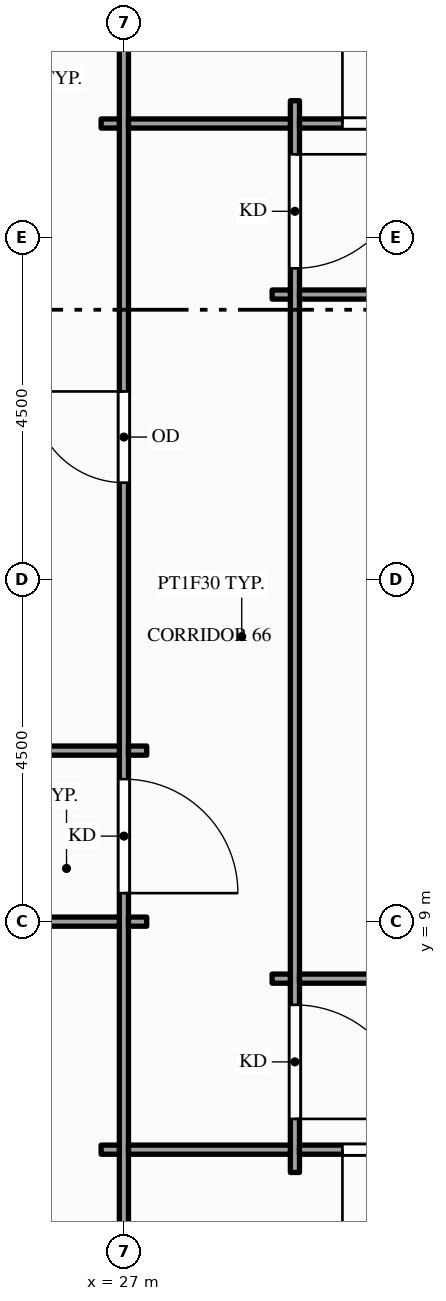
"""IFC4 building model, lengths in metres.
Left out: names, types, materials, properties, quantities, classifications, styles, units other than length and angle.
Written with IfcOpenShell. Run it as: python <this file> out.ifc"""

import sys

from ifc_helpers import new_model, si_unit, direction, frame, frame_2d, origin, place, context, subcontext, project, spatial, rectangle, extrude, element, fill, save


model = new_model("IFC4")
c1 = context("Model", 3, precision=1e-05, world=origin(), true_north=direction((0.0, 1.0)))
c2 = subcontext(c1, "Body", "Model", "MODEL_VIEW")
j1 = project(units=[si_unit("LENGTHUNIT", "METRE"), si_unit("PLANEANGLEUNIT", "RADIAN")], contexts=[c1])
p1 = place(None, origin())
s1 = spatial("IfcSite", under=j1, at=p1, CompositionType="ELEMENT")
p2 = place(p1, origin())
s2 = spatial("IfcBuilding", under=s1, at=p2, CompositionType="ELEMENT")
p3 = place(p2, frame((0.0, 0.0, 179.0)))
s3 = spatial("IfcBuildingStorey", under=s2, at=p3, CompositionType="ELEMENT", Elevation=179.0)
p4 = place(p3, frame((27.0, 1.65, 0.0), z_axis=(0.0, 0.0, 1.0), x_axis=(0.0, 1.0, 0.0)))
e1 = element("IfcWall", 1, at=p4, inside=s3, PredefinedType="PARTITIONING", context=c2, shape_type="SweptSolid", body=[
    extrude(rectangle(XDim=22.2, YDim=0.12, at=frame_2d((11.1, 0.0))), origin(), (0.0, 0.0, 1.0), 2.87),
])
p5 = place(p4, frame((7.725, 0.0, 0.0)))
e2 = element("IfcOpeningElement", 2, at=p5, cuts=e1, PredefinedType="OPENING", context=c2, shape_type="SweptSolid", body=[
    extrude(rectangle(XDim=1.5, YDim=2.1, at=frame_2d((0.75, 1.05))), frame((0.0, 0.07, 0.0), z_axis=(0.0, -1.0, 0.0), x_axis=(1.0, 0.0, 0.0)), (0.0, 0.0, 1.0), 0.14),
])
p6 = place(p4, frame((13.125, 0.0, 0.0)))
e3 = element("IfcOpeningElement", 3, at=p6, cuts=e1, PredefinedType="OPENING", context=c2, shape_type="SweptSolid", body=[
    extrude(rectangle(XDim=1.2, YDim=2.1, at=frame_2d((0.6, 1.05))), frame((0.0, 0.07, 0.0), z_axis=(0.0, -1.0, 0.0), x_axis=(1.0, 0.0, 0.0)), (0.0, 0.0, 1.0), 0.14),
])
p7 = place(p3, frame((29.25, 5.7, 0.0), z_axis=(0.0, 0.0, 1.0), x_axis=(0.0, 1.0, 0.0)))
e4 = element("IfcWall", 4, at=p7, inside=s3, PredefinedType="PARTITIONING", context=c2, shape_type="SweptSolid", body=[
    extrude(rectangle(XDim=14.1, YDim=0.12, at=frame_2d((7.05, 0.0))), origin(), (0.0, 0.0, 1.0), 2.87),
])
p8 = place(p7, frame((0.705, 0.0, 0.0)))
e5 = element("IfcOpeningElement", 5, at=p8, cuts=e4, PredefinedType="OPENING", context=c2, shape_type="SweptSolid", body=[
    extrude(rectangle(XDim=1.5, YDim=2.1, at=frame_2d((0.75, 1.05))), frame((0.0, 0.07, 0.0), z_axis=(0.0, -1.0, 0.0), x_axis=(1.0, 0.0, 0.0)), (0.0, 0.0, 1.0), 0.14),
])
p9 = place(p7, frame((11.895, 0.0, 0.0)))
e6 = element("IfcOpeningElement", 6, at=p9, cuts=e4, PredefinedType="OPENING", context=c2, shape_type="SweptSolid", body=[
    extrude(rectangle(XDim=1.5, YDim=2.1, at=frame_2d((0.75, 1.05))), frame((0.0, 0.07, 0.0), z_axis=(0.0, -1.0, 0.0), x_axis=(1.0, 0.0, 0.0)), (0.0, 0.0, 1.0), 0.14),
])
p10 = place(p3, frame((26.7, 6.0, 0.0), z_axis=(0.0, 0.0, 1.0), x_axis=(1.0, 0.0, 0.0)))
e7 = element("IfcWall", 7, at=p10, inside=s3, PredefinedType="PARTITIONING", context=c2, shape_type="SweptSolid", body=[
    extrude(rectangle(XDim=0.24, YDim=0.12, at=frame_2d((0.12, 0.0))), origin(), (0.0, 0.0, 1.0), 2.87),
])
p11 = place(p3, frame((27.06, 6.0, 0.0), z_axis=(0.0, 0.0, 1.0), x_axis=(1.0, 0.0, 0.0)))
e8 = element("IfcWall", 8, at=p11, inside=s3, PredefinedType="PARTITIONING", context=c2, shape_type="SweptSolid", body=[
    extrude(rectangle(XDim=2.13, YDim=0.12, at=frame_2d((1.065, 0.0))), origin(), (0.0, 0.0, 1.0), 2.87),
])
p12 = place(p3, frame((29.31, 6.0, 0.0), z_axis=(0.0, 0.0, 1.0), x_axis=(1.0, 0.0, 0.0)))
e9 = element("IfcWall", 9, at=p12, inside=s3, PredefinedType="PARTITIONING", context=c2, shape_type="SweptSolid", body=[
    extrude(rectangle(XDim=2.13, YDim=0.12, at=frame_2d((1.065, 0.0))), origin(), (0.0, 0.0, 1.0), 2.87),
])
p13 = place(p12, frame((0.565, 0.0, 0.0)))
e10 = element("IfcOpeningElement", 10, at=p13, cuts=e9, PredefinedType="OPENING", context=c2, shape_type="SweptSolid", body=[
    extrude(rectangle(XDim=1.0, YDim=2.1, at=frame_2d((0.5, 1.05))), frame((0.0, 0.07, 0.0), z_axis=(0.0, -1.0, 0.0), x_axis=(1.0, 0.0, 0.0)), (0.0, 0.0, 1.0), 0.14),
])
p14 = place(p3, frame((28.95, 8.25, 0.0), z_axis=(0.0, 0.0, 1.0), x_axis=(1.0, 0.0, 0.0)))
e11 = element("IfcWall", 11, at=p14, inside=s3, PredefinedType="PARTITIONING", context=c2, shape_type="SweptSolid", body=[
    extrude(rectangle(XDim=0.24, YDim=0.12, at=frame_2d((0.12, 0.0))), origin(), (0.0, 0.0, 1.0), 2.87),
])
p15 = place(p3, frame((29.31, 8.25, 0.0), z_axis=(0.0, 0.0, 1.0), x_axis=(1.0, 0.0, 0.0)))
e12 = element("IfcWall", 12, at=p15, inside=s3, PredefinedType="PARTITIONING", context=c2, shape_type="SweptSolid", body=[
    extrude(rectangle(XDim=6.63, YDim=0.12, at=frame_2d((3.315, 0.0))), origin(), (0.0, 0.0, 1.0), 2.87),
])
p16 = place(p15, frame((2.815, 0.0, 0.0)))
e13 = element("IfcOpeningElement", 13, at=p16, cuts=e12, PredefinedType="OPENING", context=c2, shape_type="SweptSolid", body=[
    extrude(rectangle(XDim=1.0, YDim=2.1, at=frame_2d((0.5, 1.05))), frame((0.0, 0.07, 0.0), z_axis=(0.0, -1.0, 0.0), x_axis=(1.0, 0.0, 0.0)), (0.0, 0.0, 1.0), 0.14),
])
p17 = place(p3, frame((22.56, 9.0, 0.0), z_axis=(0.0, 0.0, 1.0), x_axis=(1.0, 0.0, 0.0)))
e14 = element("IfcWall", 14, at=p17, inside=s3, PredefinedType="PARTITIONING", context=c2, shape_type="SweptSolid", body=[
    extrude(rectangle(XDim=4.38, YDim=0.12, at=frame_2d((2.19, 0.0))), origin(), (0.0, 0.0, 1.0), 2.87),
])
p18 = place(p17, frame((1.74, 0.0, 0.0)))
e15 = element("IfcOpeningElement", 15, at=p18, cuts=e14, PredefinedType="OPENING", context=c2, shape_type="SweptSolid", body=[
    extrude(rectangle(XDim=0.9, YDim=2.1, at=frame_2d((0.45, 1.05))), frame((0.0, 0.07, 0.0), z_axis=(0.0, -1.0, 0.0), x_axis=(1.0, 0.0, 0.0)), (0.0, 0.0, 1.0), 0.14),
])
p19 = place(p3, frame((27.06, 9.0, 0.0), z_axis=(0.0, 0.0, 1.0), x_axis=(1.0, 0.0, 0.0)))
e16 = element("IfcWall", 16, at=p19, inside=s3, PredefinedType="PARTITIONING", context=c2, shape_type="SweptSolid", body=[
    extrude(rectangle(XDim=0.24, YDim=0.12, at=frame_2d((0.12, 0.0))), origin(), (0.0, 0.0, 1.0), 2.87),
])
p20 = place(p3, frame((13.56, 11.25, 0.0), z_axis=(0.0, 0.0, 1.0), x_axis=(1.0, 0.0, 0.0)))
e17 = element("IfcWall", 17, at=p20, inside=s3, PredefinedType="PARTITIONING", context=c2, shape_type="SweptSolid", body=[
    extrude(rectangle(XDim=13.38, YDim=0.12, at=frame_2d((6.69, 0.0))), origin(), (0.0, 0.0, 1.0), 2.87),
])
p21 = place(p20, frame((3.54, 0.0, 0.0)))
e18 = element("IfcOpeningElement", 18, at=p21, cuts=e17, PredefinedType="OPENING", context=c2, shape_type="SweptSolid", body=[
    extrude(rectangle(XDim=1.8, YDim=2.1, at=frame_2d((0.9, 1.05))), frame((0.0, 0.07, 0.0), z_axis=(0.0, -1.0, 0.0), x_axis=(1.0, 0.0, 0.0)), (0.0, 0.0, 1.0), 0.14),
])
for number, where, z_axis, x_axis in (
    (19, (27.06, 11.25, 0.0), (0.0, 0.0, 1.0), (1.0, 0.0, 0.0)),
    (20, (28.95, 17.25, 0.0), (0.0, 0.0, 1.0), (1.0, 0.0, 0.0)),
):
    element("IfcWall", number, at=place(p3, frame(where, z_axis=z_axis, x_axis=x_axis)), inside=s3, PredefinedType="PARTITIONING", context=c2, shape_type="SweptSolid", body=[
        extrude(rectangle(XDim=0.24, YDim=0.12, at=frame_2d((0.12, 0.0))), origin(), (0.0, 0.0, 1.0), 2.87),
    ])
p22 = place(p3, frame((29.31, 17.25, 0.0), z_axis=(0.0, 0.0, 1.0), x_axis=(1.0, 0.0, 0.0)))
e21 = element("IfcWall", 21, at=p22, inside=s3, PredefinedType="PARTITIONING", context=c2, shape_type="SweptSolid", body=[
    extrude(rectangle(XDim=6.63, YDim=0.12, at=frame_2d((3.315, 0.0))), origin(), (0.0, 0.0, 1.0), 2.87),
])
p23 = place(p3, frame((26.7, 19.5, 0.0), z_axis=(0.0, 0.0, 1.0), x_axis=(1.0, 0.0, 0.0)))
e22 = element("IfcWall", 22, at=p23, inside=s3, PredefinedType="PARTITIONING", context=c2, shape_type="SweptSolid", body=[
    extrude(rectangle(XDim=0.24, YDim=0.12, at=frame_2d((0.12, 0.0))), origin(), (0.0, 0.0, 1.0), 2.87),
])
p24 = place(p3, frame((27.06, 19.5, 0.0), z_axis=(0.0, 0.0, 1.0), x_axis=(1.0, 0.0, 0.0)))
e23 = element("IfcWall", 23, at=p24, inside=s3, PredefinedType="PARTITIONING", context=c2, shape_type="SweptSolid", body=[
    extrude(rectangle(XDim=2.13, YDim=0.12, at=frame_2d((1.065, 0.0))), origin(), (0.0, 0.0, 1.0), 2.87),
])
p25 = place(p3, frame((29.31, 19.5, 0.0), z_axis=(0.0, 0.0, 1.0), x_axis=(1.0, 0.0, 0.0)))
e24 = element("IfcWall", 24, at=p25, inside=s3, PredefinedType="PARTITIONING", context=c2, shape_type="SweptSolid", body=[
    extrude(rectangle(XDim=2.13, YDim=0.12, at=frame_2d((1.065, 0.0))), origin(), (0.0, 0.0, 1.0), 2.87),
])
p26 = place(p25, frame((0.565, 0.0, 0.0)))
e25 = element("IfcOpeningElement", 25, at=p26, cuts=e24, PredefinedType="OPENING", context=c2, shape_type="SweptSolid", body=[
    extrude(rectangle(XDim=1.0, YDim=2.1, at=frame_2d((0.5, 1.05))), frame((0.0, 0.07, 0.0), z_axis=(0.0, -1.0, 0.0), x_axis=(1.0, 0.0, 0.0)), (0.0, 0.0, 1.0), 0.14),
])
p27 = place(p5, origin())
e26 = element("IfcDoor", 26, at=p27, inside=s3, OperationType="SINGLE_SWING_LEFT", PredefinedType="DOOR", context=c2, shape_type="SweptSolid", body=[
    extrude(rectangle(XDim=1.5, YDim=2.1, at=frame_2d((0.75, 1.05))), frame((0.0, 0.025, 0.0), z_axis=(0.0, -1.0, 0.0), x_axis=(1.0, 0.0, 0.0)), (0.0, 0.0, 1.0), 0.05),
])
fill(e2, e26)
p28 = place(p8, origin())
e27 = element("IfcDoor", 27, at=p28, inside=s3, OperationType="SINGLE_SWING_LEFT", PredefinedType="DOOR", context=c2, shape_type="SweptSolid", body=[
    extrude(rectangle(XDim=1.5, YDim=2.1, at=frame_2d((0.75, 1.05))), frame((0.0, 0.025, 0.0), z_axis=(0.0, -1.0, 0.0), x_axis=(1.0, 0.0, 0.0)), (0.0, 0.0, 1.0), 0.05),
])
fill(e5, e27)
p29 = place(p9, origin())
e28 = element("IfcDoor", 28, at=p29, inside=s3, OperationType="SINGLE_SWING_RIGHT", PredefinedType="DOOR", context=c2, shape_type="SweptSolid", body=[
    extrude(rectangle(XDim=1.5, YDim=2.1, at=frame_2d((0.75, 1.05))), frame((0.0, 0.025, 0.0), z_axis=(0.0, -1.0, 0.0), x_axis=(1.0, 0.0, 0.0)), (0.0, 0.0, 1.0), 0.05),
])
fill(e6, e28)
p30 = place(p13, origin())
e29 = element("IfcDoor", 29, at=p30, inside=s3, OperationType="SINGLE_SWING_LEFT", PredefinedType="DOOR", context=c2, shape_type="SweptSolid", body=[
    extrude(rectangle(XDim=1.0, YDim=2.1, at=frame_2d((0.5, 1.05))), frame((0.0, 0.025, 0.0), z_axis=(0.0, -1.0, 0.0), x_axis=(1.0, 0.0, 0.0)), (0.0, 0.0, 1.0), 0.05),
])
fill(e10, e29)
p31 = place(p26, origin())
e30 = element("IfcDoor", 30, at=p31, inside=s3, OperationType="SINGLE_SWING_LEFT", PredefinedType="DOOR", context=c2, shape_type="SweptSolid", body=[
    extrude(rectangle(XDim=1.0, YDim=2.1, at=frame_2d((0.5, 1.05))), frame((0.0, 0.025, 0.0), z_axis=(0.0, -1.0, 0.0), x_axis=(1.0, 0.0, 0.0)), (0.0, 0.0, 1.0), 0.05),
])
fill(e25, e30)
p32 = place(p6, origin())
e31 = element("IfcDoor", 31, at=p32, inside=s3, OperationType="SINGLE_SWING_RIGHT", PredefinedType="DOOR", context=c2, shape_type="SweptSolid", body=[
    extrude(rectangle(XDim=1.2, YDim=2.1, at=frame_2d((0.6, 1.05))), frame((0.0, 0.025, 0.0), z_axis=(0.0, -1.0, 0.0), x_axis=(1.0, 0.0, 0.0)), (0.0, 0.0, 1.0), 0.05),
])
fill(e3, e31)
save(model, sys.argv[1])
